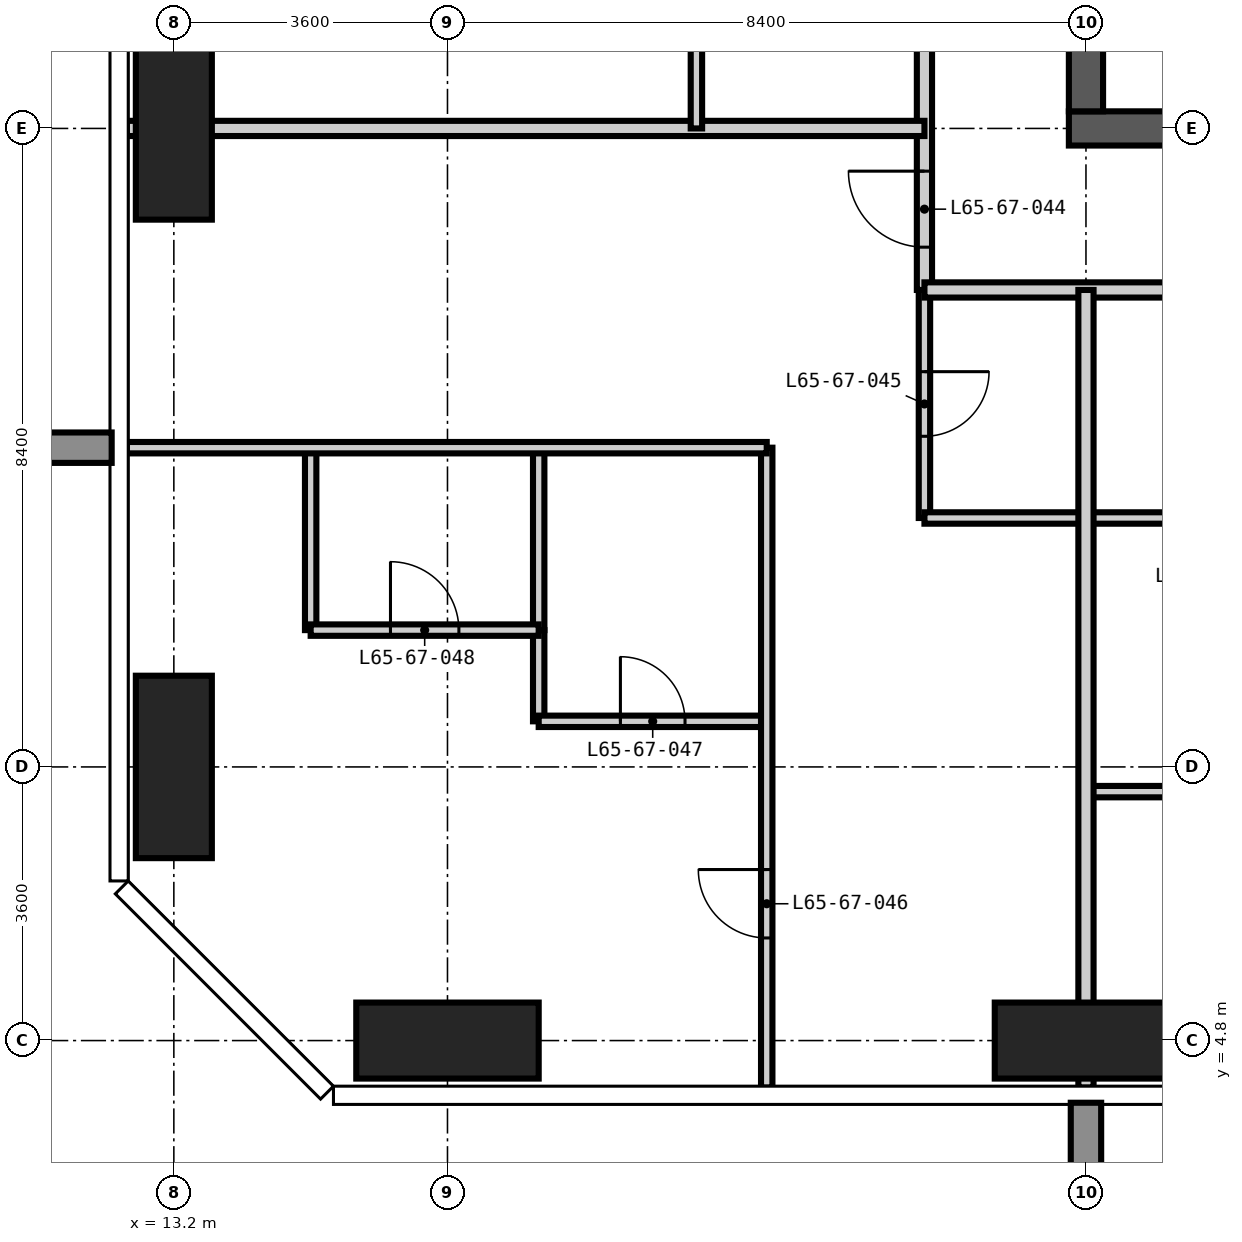
"""IFC4 building model, lengths in metres.
Left out: names, types, materials, properties, quantities, classifications, styles, units other than length and angle.
Written with IfcOpenShell. Run it as: python <this file> out.ifc"""

import sys

from ifc_helpers import new_model, si_unit, direction, frame, frame_2d, origin, origin_2d, place, context, subcontext, project, spatial, rectangle, extrude, element, fill, save


model = new_model("IFC4")
c1 = context("Model", 3, precision=1e-05, world=origin(), true_north=direction((0.0, 1.0)))
c2 = subcontext(c1, "Body", "Model", "MODEL_VIEW")
j1 = project(units=[si_unit("LENGTHUNIT", "METRE"), si_unit("PLANEANGLEUNIT", "RADIAN")], contexts=[c1])
p1 = place(None, origin())
s1 = spatial("IfcSite", under=j1, at=p1, CompositionType="ELEMENT")
p2 = place(p1, origin())
s2 = spatial("IfcBuilding", under=s1, at=p2, CompositionType="ELEMENT")
p3 = place(p2, frame((0.0, 0.0, 252.9)))
s3 = spatial("IfcBuildingStorey", under=s2, at=p3, CompositionType="ELEMENT", Elevation=252.9)
for number, where, z_axis, x_axis in (
    (1, (13.2, 8.4, -0.35), (0.0, 0.0, 1.0), (1.0, 0.0, 0.0)),
    (2, (13.2, 16.8, -0.35), (0.0, 0.0, 1.0), (1.0, 0.0, 0.0)),
):
    element("IfcColumn", number, at=place(p3, frame(where, z_axis=z_axis, x_axis=x_axis)), inside=s3, PredefinedType="COLUMN", context=c2, shape_type="SweptSolid", body=[
        extrude(rectangle(XDim=1.0, YDim=2.4, at=origin_2d()), origin(), (0.0, 0.0, 1.0), 3.9),
    ])
for number, where, z_axis, x_axis in (
    (3, (16.8, 4.8, -0.35), (0.0, 0.0, 1.0), (1.0, 0.0, 0.0)),
    (4, (25.2, 4.8, -0.35), (0.0, 0.0, 1.0), (1.0, 0.0, 0.0)),
):
    element("IfcColumn", number, at=place(p3, frame(where, z_axis=z_axis, x_axis=x_axis)), inside=s3, PredefinedType="COLUMN", context=c2, shape_type="SweptSolid", body=[
        extrude(rectangle(XDim=2.4, YDim=1.0, at=origin_2d()), origin(), (0.0, 0.0, 1.0), 3.9),
    ])
p4 = place(p3, frame((24.975, 16.8, -0.35), z_axis=(0.0, 0.0, 1.0), x_axis=(1.0, 0.0, 0.0)))
e5 = element("IfcWall", 5, at=p4, inside=s3, PredefinedType="SHEAR", context=c2, shape_type="SweptSolid", body=[
    extrude(rectangle(XDim=17.25, YDim=0.45, at=frame_2d((8.625, 0.0))), origin(), (0.0, 0.0, 1.0), 3.9),
])
p5 = place(p4, frame((3.925, 0.0, 0.35)))
e6 = element("IfcOpeningElement", 6, at=p5, cuts=e5, PredefinedType="OPENING", context=c2, shape_type="SweptSolid", body=[
    extrude(rectangle(XDim=1.0, YDim=2.1, at=frame_2d((0.5, 1.05))), frame((0.0, 0.235, 0.0), z_axis=(0.0, -1.0, 0.0), x_axis=(1.0, 0.0, 0.0)), (0.0, 0.0, 1.0), 0.47),
])
p6 = place(p4, frame((10.225, 0.0, 0.35)))
e7 = element("IfcOpeningElement", 7, at=p6, cuts=e5, PredefinedType="OPENING", context=c2, shape_type="SweptSolid", body=[
    extrude(rectangle(XDim=1.0, YDim=2.1, at=frame_2d((0.5, 1.05))), frame((0.0, 0.235, 0.0), z_axis=(0.0, -1.0, 0.0), x_axis=(1.0, 0.0, 0.0)), (0.0, 0.0, 1.0), 0.47),
])
p7 = place(p3, frame((25.2, 41.775, -0.35), z_axis=(0.0, 0.0, 1.0), x_axis=(0.0, -1.0, 0.0)))
e8 = element("IfcWall", 8, at=p7, inside=s3, PredefinedType="SHEAR", context=c2, shape_type="SweptSolid", body=[
    extrude(rectangle(XDim=24.75, YDim=0.45, at=frame_2d((12.375, 0.0))), origin(), (0.0, 0.0, 1.0), 3.9),
])
p8 = place(p7, frame((11.875, 0.0, 0.35)))
e9 = element("IfcOpeningElement", 9, at=p8, cuts=e8, PredefinedType="OPENING", context=c2, shape_type="SweptSolid", body=[
    extrude(rectangle(XDim=1.0, YDim=2.1, at=frame_2d((0.5, 1.05))), frame((0.0, 0.235, 0.0), z_axis=(0.0, -1.0, 0.0), x_axis=(1.0, 0.0, 0.0)), (0.0, 0.0, 1.0), 0.47),
])
p9 = place(p3, frame((18.0, 9.0, 0.0), z_axis=(0.0, 0.0, 1.0), x_axis=(0.0, 1.0, 0.0)))
e10 = element("IfcWall", 10, at=p9, inside=s3, PredefinedType="PARTITIONING", context=c2, shape_type="SweptSolid", body=[
    extrude(rectangle(XDim=1.2, YDim=0.15, at=frame_2d((0.6, 0.0))), origin(), (0.0, 0.0, 1.0), 3.55),
])
p10 = place(p3, frame((23.075, 11.675, 0.0), z_axis=(0.0, 0.0, 1.0), x_axis=(0.0, 1.0, 0.0)))
e11 = element("IfcWall", 11, at=p10, inside=s3, PredefinedType="PARTITIONING", context=c2, shape_type="SweptSolid", body=[
    extrude(rectangle(XDim=3.0, YDim=0.15, at=frame_2d((1.5, 0.0))), origin(), (0.0, 0.0, 1.0), 3.55),
])
p11 = place(p10, frame((1.075, 0.0, 0.0)))
e12 = element("IfcOpeningElement", 12, at=p11, cuts=e11, PredefinedType="OPENING", context=c2, shape_type="SweptSolid", body=[
    extrude(rectangle(XDim=0.85, YDim=2.1, at=frame_2d((0.425, 1.05))), frame((0.0, 0.085, 0.0), z_axis=(0.0, -1.0, 0.0), x_axis=(1.0, 0.0, 0.0)), (0.0, 0.0, 1.0), 0.17),
])
p12 = place(p3, frame((25.2, 8.075, 0.0), z_axis=(0.0, 0.0, 1.0), x_axis=(1.0, 0.0, 0.0)))
e13 = element("IfcWall", 13, at=p12, inside=s3, PredefinedType="PARTITIONING", context=c2, shape_type="SweptSolid", body=[
    extrude(rectangle(XDim=2.7, YDim=0.15, at=frame_2d((1.35, 0.0))), origin(), (0.0, 0.0, 1.0), 3.55),
])
p13 = place(p3, frame((18.0, 9.0, 0.0), z_axis=(0.0, 0.0, 1.0), x_axis=(1.0, 0.0, 0.0)))
e14 = element("IfcWall", 14, at=p13, inside=s3, PredefinedType="PARTITIONING", context=c2, shape_type="SweptSolid", body=[
    extrude(rectangle(XDim=3.0, YDim=0.15, at=frame_2d((1.5, 0.0))), origin(), (0.0, 0.0, 1.0), 3.55),
])
p14 = place(p13, frame((1.075, 0.0, 0.0)))
e15 = element("IfcOpeningElement", 15, at=p14, cuts=e14, PredefinedType="OPENING", context=c2, shape_type="SweptSolid", body=[
    extrude(rectangle(XDim=0.85, YDim=2.1, at=frame_2d((0.425, 1.05))), frame((0.0, 0.085, 0.0), z_axis=(0.0, -1.0, 0.0), x_axis=(1.0, 0.0, 0.0)), (0.0, 0.0, 1.0), 0.17),
])
p15 = place(p3, frame((23.075, 11.675, 0.0), z_axis=(0.0, 0.0, 1.0), x_axis=(1.0, 0.0, 0.0)))
e16 = element("IfcWall", 16, at=p15, inside=s3, PredefinedType="PARTITIONING", context=c2, shape_type="SweptSolid", body=[
    extrude(rectangle(XDim=4.825, YDim=0.15, at=frame_2d((2.413, 0.0))), origin(), (0.0, 0.0, 1.0), 3.55),
])
p16 = place(p3, frame((23.075, 14.675, 0.0), z_axis=(0.0, 0.0, 1.0), x_axis=(0.0, 1.0, 0.0)))
e17 = element("IfcWall", 17, at=p16, inside=s3, PredefinedType="PARTITIONING", context=c2, shape_type="SweptSolid", body=[
    extrude(rectangle(XDim=30.65, YDim=0.2, at=frame_2d((15.325, 0.0))), origin(), (0.0, 0.0, 1.0), 3.55),
])
p17 = place(p16, frame((4.925, 0.0, 0.0)))
e18 = element("IfcOpeningElement", 18, at=p17, cuts=e17, PredefinedType="OPENING", context=c2, shape_type="SweptSolid", body=[
    extrude(rectangle(XDim=1.0, YDim=2.2, at=frame_2d((0.5, 1.1))), frame((0.0, 0.11, 0.0), z_axis=(0.0, -1.0, 0.0), x_axis=(1.0, 0.0, 0.0)), (0.0, 0.0, 1.0), 0.22),
])
p18 = place(p16, frame((15.125, 0.0, 0.0)))
e19 = element("IfcOpeningElement", 19, at=p18, cuts=e17, PredefinedType="OPENING", context=c2, shape_type="SweptSolid", body=[
    extrude(rectangle(XDim=1.0, YDim=2.2, at=frame_2d((0.5, 1.1))), frame((0.0, 0.11, 0.0), z_axis=(0.0, -1.0, 0.0), x_axis=(1.0, 0.0, 0.0)), (0.0, 0.0, 1.0), 0.22),
])
p19 = place(p16, frame((21.725, 0.0, 0.0)))
e20 = element("IfcOpeningElement", 20, at=p19, cuts=e17, PredefinedType="OPENING", context=c2, shape_type="SweptSolid", body=[
    extrude(rectangle(XDim=1.0, YDim=2.2, at=frame_2d((0.5, 1.1))), frame((0.0, 0.11, 0.0), z_axis=(0.0, -1.0, 0.0), x_axis=(1.0, 0.0, 0.0)), (0.0, 0.0, 1.0), 0.22),
])
p20 = place(p16, frame((0.563, 0.0, 0.0)))
e21 = element("IfcOpeningElement", 21, at=p20, cuts=e17, PredefinedType="OPENING", context=c2, shape_type="SweptSolid", body=[
    extrude(rectangle(XDim=1.0, YDim=2.2, at=frame_2d((0.5, 1.1))), frame((0.0, 0.11, 0.0), z_axis=(0.0, -1.0, 0.0), x_axis=(1.0, 0.0, 0.0)), (0.0, 0.0, 1.0), 0.22),
])
p21 = place(p16, frame((28.488, 0.0, 0.0)))
e22 = element("IfcOpeningElement", 22, at=p21, cuts=e17, PredefinedType="OPENING", context=c2, shape_type="SweptSolid", body=[
    extrude(rectangle(XDim=1.0, YDim=2.2, at=frame_2d((0.5, 1.1))), frame((0.0, 0.11, 0.0), z_axis=(0.0, -1.0, 0.0), x_axis=(1.0, 0.0, 0.0)), (0.0, 0.0, 1.0), 0.22),
])
p22 = place(p3, frame((44.725, 14.675, 0.0), z_axis=(0.0, 0.0, 1.0), x_axis=(-1.0, 0.0, 0.0)))
e23 = element("IfcWall", 23, at=p22, inside=s3, PredefinedType="PARTITIONING", context=c2, shape_type="SweptSolid", body=[
    extrude(rectangle(XDim=21.65, YDim=0.2, at=frame_2d((10.825, 0.0))), origin(), (0.0, 0.0, 1.0), 3.55),
])
p23 = place(p22, frame((11.825, 0.0, 0.0)))
e24 = element("IfcOpeningElement", 24, at=p23, cuts=e23, PredefinedType="OPENING", context=c2, shape_type="SweptSolid", body=[
    extrude(rectangle(XDim=1.0, YDim=2.2, at=frame_2d((0.5, 1.1))), frame((0.0, 0.11, 0.0), z_axis=(0.0, -1.0, 0.0), x_axis=(1.0, 0.0, 0.0)), (0.0, 0.0, 1.0), 0.22),
])
p24 = place(p3, frame((25.2, 4.182, 0.0), z_axis=(0.0, 0.0, 1.0), x_axis=(0.0, 1.0, 0.0)))
e25 = element("IfcWall", 25, at=p24, inside=s3, PredefinedType="PARTITIONING", context=c2, shape_type="SweptSolid", body=[
    extrude(rectangle(XDim=10.493, YDim=0.2, at=frame_2d((5.247, 0.0))), origin(), (0.0, 0.0, 1.0), 3.55),
])
p25 = place(p3, frame((12.582, 16.8, 0.0), z_axis=(0.0, 0.0, 1.0), x_axis=(1.0, 0.0, 0.0)))
e26 = element("IfcWall", 26, at=p25, inside=s3, PredefinedType="PARTITIONING", context=c2, shape_type="SweptSolid", body=[
    extrude(rectangle(XDim=10.493, YDim=0.2, at=frame_2d((5.247, 0.0))), origin(), (0.0, 0.0, 1.0), 3.55),
])
for number, where, z_axis, x_axis in (
    (27, (15.0, 10.2, 0.0), (0.0, 0.0, 1.0), (0.0, 1.0, 0.0)),
    (28, (18.0, 10.2, 0.0), (0.0, 0.0, 1.0), (0.0, 1.0, 0.0)),
):
    element("IfcWall", number, at=place(p3, frame(where, z_axis=z_axis, x_axis=x_axis)), inside=s3, PredefinedType="PARTITIONING", context=c2, shape_type="SweptSolid", body=[
        extrude(rectangle(XDim=2.4, YDim=0.15, at=frame_2d((1.2, 0.0))), origin(), (0.0, 0.0, 1.0), 3.55),
    ])
p26 = place(p3, frame((20.075, 16.8, 0.0), z_axis=(0.0, 0.0, 1.0), x_axis=(0.0, 1.0, 0.0)))
e29 = element("IfcWall", 29, at=p26, inside=s3, PredefinedType="PARTITIONING", context=c2, shape_type="SweptSolid", body=[
    extrude(rectangle(XDim=2.4, YDim=0.15, at=frame_2d((1.2, 0.0))), origin(), (0.0, 0.0, 1.0), 3.55),
])
p27 = place(p3, frame((21.0, 4.182, 0.0), z_axis=(0.0, 0.0, 1.0), x_axis=(0.0, 1.0, 0.0)))
e30 = element("IfcWall", 30, at=p27, inside=s3, PredefinedType="PARTITIONING", context=c2, shape_type="SweptSolid", body=[
    extrude(rectangle(XDim=8.418, YDim=0.15, at=frame_2d((4.209, 0.0))), origin(), (0.0, 0.0, 1.0), 3.55),
])
p28 = place(p27, frame((1.968, 0.0, 0.0)))
e31 = element("IfcOpeningElement", 31, at=p28, cuts=e30, PredefinedType="OPENING", context=c2, shape_type="SweptSolid", body=[
    extrude(rectangle(XDim=0.9, YDim=2.1, at=frame_2d((0.45, 1.05))), frame((0.0, 0.085, 0.0), z_axis=(0.0, -1.0, 0.0), x_axis=(1.0, 0.0, 0.0)), (0.0, 0.0, 1.0), 0.17),
])
p29 = place(p3, frame((15.0, 10.2, 0.0), z_axis=(0.0, 0.0, 1.0), x_axis=(1.0, 0.0, 0.0)))
e32 = element("IfcWall", 32, at=p29, inside=s3, PredefinedType="PARTITIONING", context=c2, shape_type="SweptSolid", body=[
    extrude(rectangle(XDim=3.0, YDim=0.15, at=frame_2d((1.5, 0.0))), origin(), (0.0, 0.0, 1.0), 3.55),
])
p30 = place(p29, frame((1.05, 0.0, 0.0)))
e33 = element("IfcOpeningElement", 33, at=p30, cuts=e32, PredefinedType="OPENING", context=c2, shape_type="SweptSolid", body=[
    extrude(rectangle(XDim=0.9, YDim=2.1, at=frame_2d((0.45, 1.05))), frame((0.0, 0.085, 0.0), z_axis=(0.0, -1.0, 0.0), x_axis=(1.0, 0.0, 0.0)), (0.0, 0.0, 1.0), 0.17),
])
p31 = place(p3, frame((12.582, 12.6, 0.0), z_axis=(0.0, 0.0, 1.0), x_axis=(1.0, 0.0, 0.0)))
e34 = element("IfcWall", 34, at=p31, inside=s3, PredefinedType="PARTITIONING", context=c2, shape_type="SweptSolid", body=[
    extrude(rectangle(XDim=8.418, YDim=0.15, at=frame_2d((4.209, 0.0))), origin(), (0.0, 0.0, 1.0), 3.55),
])
p32 = place(p20, origin())
e35 = element("IfcDoor", 35, at=p32, inside=s3, OperationType="SINGLE_SWING_RIGHT", PredefinedType="DOOR", context=c2, shape_type="SweptSolid", body=[
    extrude(rectangle(XDim=1.0, YDim=2.2, at=frame_2d((0.5, 1.1))), frame((0.0, 0.025, 0.0), z_axis=(0.0, -1.0, 0.0), x_axis=(1.0, 0.0, 0.0)), (0.0, 0.0, 1.0), 0.05),
])
fill(e21, e35)
p33 = place(p11, frame((0.85, 0.0, 0.0), z_axis=(0.0, 0.0, 1.0), x_axis=(-1.0, 0.0, 0.0)))
e36 = element("IfcDoor", 36, at=p33, inside=s3, OperationType="SINGLE_SWING_LEFT", PredefinedType="DOOR", context=c2, shape_type="SweptSolid", body=[
    extrude(rectangle(XDim=0.85, YDim=2.1, at=frame_2d((0.425, 1.05))), frame((0.0, 0.025, 0.0), z_axis=(0.0, -1.0, 0.0), x_axis=(1.0, 0.0, 0.0)), (0.0, 0.0, 1.0), 0.05),
])
fill(e12, e36)
p34 = place(p28, origin())
e37 = element("IfcDoor", 37, at=p34, inside=s3, OperationType="SINGLE_SWING_RIGHT", PredefinedType="DOOR", context=c2, shape_type="SweptSolid", body=[
    extrude(rectangle(XDim=0.9, YDim=2.1, at=frame_2d((0.45, 1.05))), frame((0.0, 0.025, 0.0), z_axis=(0.0, -1.0, 0.0), x_axis=(1.0, 0.0, 0.0)), (0.0, 0.0, 1.0), 0.05),
])
fill(e31, e37)
p35 = place(p14, origin())
e38 = element("IfcDoor", 38, at=p35, inside=s3, OperationType="SINGLE_SWING_LEFT", PredefinedType="DOOR", context=c2, shape_type="SweptSolid", body=[
    extrude(rectangle(XDim=0.85, YDim=2.1, at=frame_2d((0.425, 1.05))), frame((0.0, 0.025, 0.0), z_axis=(0.0, -1.0, 0.0), x_axis=(1.0, 0.0, 0.0)), (0.0, 0.0, 1.0), 0.05),
])
fill(e15, e38)
p36 = place(p30, origin())
e39 = element("IfcDoor", 39, at=p36, inside=s3, OperationType="SINGLE_SWING_LEFT", PredefinedType="DOOR", context=c2, shape_type="SweptSolid", body=[
    extrude(rectangle(XDim=0.9, YDim=2.1, at=frame_2d((0.45, 1.05))), frame((0.0, 0.025, 0.0), z_axis=(0.0, -1.0, 0.0), x_axis=(1.0, 0.0, 0.0)), (0.0, 0.0, 1.0), 0.05),
])
fill(e33, e39)
save(model, sys.argv[1])
